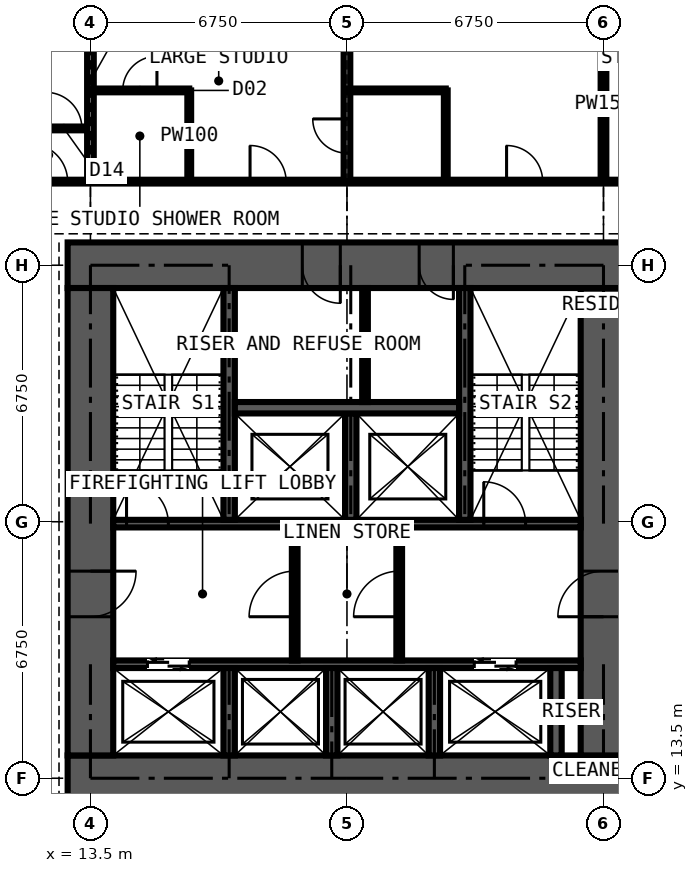
"""IFC4 building model, lengths in metres.
Left out: names, types, materials, properties, quantities, classifications, styles, units other than length and angle.
Written with IfcOpenShell. Run it as: python <this file> out.ifc"""

import sys

from ifc_helpers import new_model, si_unit, direction, frame, frame_2d, origin, place, context, subcontext, project, spatial, rectangle, extrude, element, fill, save


model = new_model("IFC4")
c1 = context("Model", 3, precision=1e-05, world=origin(), true_north=direction((0.0, 1.0)))
c2 = subcontext(c1, "Body", "Model", "MODEL_VIEW")
j1 = project(units=[si_unit("LENGTHUNIT", "METRE"), si_unit("PLANEANGLEUNIT", "RADIAN")], contexts=[c1])
p1 = place(None, origin())
s1 = spatial("IfcSite", under=j1, at=p1, CompositionType="ELEMENT")
p2 = place(p1, origin())
s2 = spatial("IfcBuilding", under=s1, at=p2, CompositionType="ELEMENT")
p3 = place(p2, frame((0.0, 0.0, 90.9)))
s3 = spatial("IfcBuildingStorey", under=s2, at=p3, CompositionType="ELEMENT", Elevation=90.9)
p4 = place(p3, frame((12.9, 13.5, 0.0), z_axis=(0.0, 0.0, 1.0), x_axis=(1.0, 0.0, 0.0)))
e1 = element("IfcWall", 1, at=p4, inside=s3, PredefinedType="SHEAR", context=c2, shape_type="SweptSolid", body=[
    extrude(rectangle(XDim=14.7, YDim=1.2, at=frame_2d((7.35, 0.0))), origin(), (0.0, 0.0, 1.0), 3.6),
])
p5 = place(p3, frame((27.0, 14.1, 0.0), z_axis=(0.0, 0.0, 1.0), x_axis=(0.0, 1.0, 0.0)))
e2 = element("IfcWall", 2, at=p5, inside=s3, PredefinedType="SHEAR", context=c2, shape_type="SweptSolid", body=[
    extrude(rectangle(XDim=12.3, YDim=1.2, at=frame_2d((6.15, 0.0))), origin(), (0.0, 0.0, 1.0), 3.6),
])
p6 = place(p5, frame((3.65, 0.0, 0.0)))
e3 = element("IfcOpeningElement", 3, at=p6, cuts=e2, PredefinedType="OPENING", context=c2, shape_type="SweptSolid", body=[
    extrude(rectangle(XDim=1.2, YDim=2.2, at=frame_2d((0.6, 1.1))), frame((0.0, 0.61, 0.0), z_axis=(0.0, -1.0, 0.0), x_axis=(1.0, 0.0, 0.0)), (0.0, 0.0, 1.0), 1.22),
])
p7 = place(p3, frame((27.6, 27.0, 0.0), z_axis=(0.0, 0.0, 1.0), x_axis=(-1.0, 0.0, 0.0)))
e4 = element("IfcWall", 4, at=p7, inside=s3, PredefinedType="SHEAR", context=c2, shape_type="SweptSolid", body=[
    extrude(rectangle(XDim=14.7, YDim=1.2, at=frame_2d((7.35, 0.0))), origin(), (0.0, 0.0, 1.0), 3.6),
])
p8 = place(p7, frame((4.55, 0.0, 0.0)))
e5 = element("IfcOpeningElement", 5, at=p8, cuts=e4, PredefinedType="OPENING", context=c2, shape_type="SweptSolid", body=[
    extrude(rectangle(XDim=0.9, YDim=2.2, at=frame_2d((0.45, 1.1))), frame((0.0, 0.61, 0.0), z_axis=(0.0, -1.0, 0.0), x_axis=(1.0, 0.0, 0.0)), (0.0, 0.0, 1.0), 1.22),
])
p9 = place(p7, frame((7.525, 0.0, 0.0)))
e6 = element("IfcOpeningElement", 6, at=p9, cuts=e4, PredefinedType="OPENING", context=c2, shape_type="SweptSolid", body=[
    extrude(rectangle(XDim=1.0, YDim=2.2, at=frame_2d((0.5, 1.1))), frame((0.0, 0.61, 0.0), z_axis=(0.0, -1.0, 0.0), x_axis=(1.0, 0.0, 0.0)), (0.0, 0.0, 1.0), 1.22),
])
p10 = place(p3, frame((13.5, 26.4, 0.0), z_axis=(0.0, 0.0, 1.0), x_axis=(0.0, -1.0, 0.0)))
e7 = element("IfcWall", 7, at=p10, inside=s3, PredefinedType="SHEAR", context=c2, shape_type="SweptSolid", body=[
    extrude(rectangle(XDim=12.3, YDim=1.2, at=frame_2d((6.15, 0.0))), origin(), (0.0, 0.0, 1.0), 3.6),
])
p11 = place(p10, frame((7.45, 0.0, 0.0)))
e8 = element("IfcOpeningElement", 8, at=p11, cuts=e7, PredefinedType="OPENING", context=c2, shape_type="SweptSolid", body=[
    extrude(rectangle(XDim=1.2, YDim=2.2, at=frame_2d((0.6, 1.1))), frame((0.0, 0.61, 0.0), z_axis=(0.0, -1.0, 0.0), x_axis=(1.0, 0.0, 0.0)), (0.0, 0.0, 1.0), 1.22),
])
p12 = place(p3, frame((14.1, 16.5, 0.0), z_axis=(0.0, 0.0, 1.0), x_axis=(1.0, 0.0, 0.0)))
e9 = element("IfcWall", 9, at=p12, inside=s3, PredefinedType="SHEAR", context=c2, shape_type="SweptSolid", body=[
    extrude(rectangle(XDim=12.3, YDim=0.2, at=frame_2d((6.15, 0.0))), origin(), (0.0, 0.0, 1.0), 3.6),
])
p13 = place(p12, frame((0.9, 0.0, 0.0)))
e10 = element("IfcOpeningElement", 10, at=p13, cuts=e9, PredefinedType="OPENING", context=c2, shape_type="SweptSolid", body=[
    extrude(rectangle(XDim=1.1, YDim=2.2, at=frame_2d((0.55, 1.1))), frame((0.0, 0.11, 0.0), z_axis=(0.0, -1.0, 0.0), x_axis=(1.0, 0.0, 0.0)), (0.0, 0.0, 1.0), 0.22),
])
p14 = place(p12, frame((9.5, 0.0, 0.0)))
e11 = element("IfcOpeningElement", 11, at=p14, cuts=e9, PredefinedType="OPENING", context=c2, shape_type="SweptSolid", body=[
    extrude(rectangle(XDim=1.1, YDim=2.2, at=frame_2d((0.55, 1.1))), frame((0.0, 0.11, 0.0), z_axis=(0.0, -1.0, 0.0), x_axis=(1.0, 0.0, 0.0)), (0.0, 0.0, 1.0), 0.22),
])
p15 = place(p3, frame((14.1, 20.2, 0.0), z_axis=(0.0, 0.0, 1.0), x_axis=(1.0, 0.0, 0.0)))
e12 = element("IfcWall", 12, at=p15, inside=s3, PredefinedType="SHEAR", context=c2, shape_type="SweptSolid", body=[
    extrude(rectangle(XDim=12.3, YDim=0.2, at=frame_2d((6.15, 0.0))), origin(), (0.0, 0.0, 1.0), 3.6),
])
p16 = place(p15, frame((0.35, 0.0, 0.0)))
e13 = element("IfcOpeningElement", 13, at=p16, cuts=e12, PredefinedType="OPENING", context=c2, shape_type="SweptSolid", body=[
    extrude(rectangle(XDim=1.1, YDim=2.2, at=frame_2d((0.55, 1.1))), frame((0.0, 0.11, 0.0), z_axis=(0.0, -1.0, 0.0), x_axis=(1.0, 0.0, 0.0)), (0.0, 0.0, 1.0), 0.22),
])
p17 = place(p15, frame((9.75, 0.0, 0.0)))
e14 = element("IfcOpeningElement", 14, at=p17, cuts=e12, PredefinedType="OPENING", context=c2, shape_type="SweptSolid", body=[
    extrude(rectangle(XDim=1.1, YDim=2.2, at=frame_2d((0.55, 1.1))), frame((0.0, 0.11, 0.0), z_axis=(0.0, -1.0, 0.0), x_axis=(1.0, 0.0, 0.0)), (0.0, 0.0, 1.0), 0.22),
])
for number, where, z_axis, x_axis in (
    (15, (17.15, 20.3, 0.0), (0.0, 0.0, 1.0), (0.0, 1.0, 0.0)),
    (16, (23.35, 20.3, 0.0), (0.0, 0.0, 1.0), (0.0, 1.0, 0.0)),
):
    element("IfcWall", number, at=place(p3, frame(where, z_axis=z_axis, x_axis=x_axis)), inside=s3, PredefinedType="SHEAR", context=c2, shape_type="SweptSolid", body=[
        extrude(rectangle(XDim=6.1, YDim=0.3, at=frame_2d((3.05, 0.0))), origin(), (0.0, 0.0, 1.0), 3.6),
    ])
p18 = place(p3, frame((20.35, 20.3, 0.0), z_axis=(0.0, 0.0, 1.0), x_axis=(0.0, 1.0, 0.0)))
e17 = element("IfcWall", 17, at=p18, inside=s3, PredefinedType="SHEAR", context=c2, shape_type="SweptSolid", body=[
    extrude(rectangle(XDim=2.8, YDim=0.3, at=frame_2d((1.4, 0.0))), origin(), (0.0, 0.0, 1.0), 3.6),
])
p19 = place(p3, frame((17.3, 23.25, 0.0), z_axis=(0.0, 0.0, 1.0), x_axis=(1.0, 0.0, 0.0)))
e18 = element("IfcWall", 18, at=p19, inside=s3, PredefinedType="SHEAR", context=c2, shape_type="SweptSolid", body=[
    extrude(rectangle(XDim=5.9, YDim=0.3, at=frame_2d((2.95, 0.0))), origin(), (0.0, 0.0, 1.0), 3.6),
])
for number, where, z_axis, x_axis in (
    (19, (17.15, 14.1, 0.0), (0.0, 0.0, 1.0), (0.0, 1.0, 0.0)),
    (20, (19.85, 14.1, 0.0), (0.0, 0.0, 1.0), (0.0, 1.0, 0.0)),
    (21, (22.55, 14.1, 0.0), (0.0, 0.0, 1.0), (0.0, 1.0, 0.0)),
    (22, (25.75, 14.1, 0.0), (0.0, 0.0, 1.0), (0.0, 1.0, 0.0)),
):
    element("IfcWall", number, at=place(p3, frame(where, z_axis=z_axis, x_axis=x_axis)), inside=s3, PredefinedType="SHEAR", context=c2, shape_type="SweptSolid", body=[
        extrude(rectangle(XDim=2.3, YDim=0.3, at=frame_2d((1.15, 0.0))), origin(), (0.0, 0.0, 1.0), 3.6),
    ])
p20 = place(p3, frame((18.875, 16.6, 0.0), z_axis=(0.0, 0.0, 1.0), x_axis=(0.0, 1.0, 0.0)))
e23 = element("IfcWall", 23, at=p20, inside=s3, PredefinedType="PARTITIONING", context=c2, shape_type="SweptSolid", body=[
    extrude(rectangle(XDim=3.5, YDim=0.15, at=frame_2d((1.75, 0.0))), origin(), (0.0, 0.0, 1.0), 3.375),
])
p21 = place(p20, frame((1.15, 0.0, 0.0)))
e24 = element("IfcOpeningElement", 24, at=p21, cuts=e23, PredefinedType="OPENING", context=c2, shape_type="SweptSolid", body=[
    extrude(rectangle(XDim=1.2, YDim=2.2, at=frame_2d((0.6, 1.1))), frame((0.0, 0.085, 0.0), z_axis=(0.0, -1.0, 0.0), x_axis=(1.0, 0.0, 0.0)), (0.0, 0.0, 1.0), 0.17),
])
p22 = place(p3, frame((21.625, 16.6, 0.0), z_axis=(0.0, 0.0, 1.0), x_axis=(0.0, 1.0, 0.0)))
e25 = element("IfcWall", 25, at=p22, inside=s3, PredefinedType="PARTITIONING", context=c2, shape_type="SweptSolid", body=[
    extrude(rectangle(XDim=3.5, YDim=0.15, at=frame_2d((1.75, 0.0))), origin(), (0.0, 0.0, 1.0), 3.375),
])
p23 = place(p22, frame((1.15, 0.0, 0.0)))
e26 = element("IfcOpeningElement", 26, at=p23, cuts=e25, PredefinedType="OPENING", context=c2, shape_type="SweptSolid", body=[
    extrude(rectangle(XDim=1.2, YDim=2.2, at=frame_2d((0.6, 1.1))), frame((0.0, 0.085, 0.0), z_axis=(0.0, -1.0, 0.0), x_axis=(1.0, 0.0, 0.0)), (0.0, 0.0, 1.0), 0.17),
])
p24 = place(p3, frame((20.725, 23.4, 0.0), z_axis=(0.0, 0.0, 1.0), x_axis=(0.0, 1.0, 0.0)))
e27 = element("IfcWall", 27, at=p24, inside=s3, PredefinedType="PARTITIONING", context=c2, shape_type="SweptSolid", body=[
    extrude(rectangle(XDim=3.0, YDim=0.15, at=frame_2d((1.5, 0.0))), origin(), (0.0, 0.0, 1.0), 3.375),
])
p25 = place(p3, frame((10.125, 30.6, 0.0), z_axis=(0.0, 0.0, 1.0), x_axis=(1.0, 0.0, 0.0)))
e28 = element("IfcWall", 28, at=p25, inside=s3, PredefinedType="PARTITIONING", context=c2, shape_type="SweptSolid", body=[
    extrude(rectangle(XDim=3.375, YDim=0.1, at=frame_2d((1.688, 0.0))), origin(), (0.0, 0.0, 1.0), 3.375),
])
p26 = place(p25, frame((2.2, 0.0, 0.0)))
e29 = element("IfcOpeningElement", 29, at=p26, cuts=e28, PredefinedType="OPENING", context=c2, shape_type="SweptSolid", body=[
    extrude(rectangle(XDim=0.95, YDim=2.2, at=frame_2d((0.475, 1.1))), frame((0.0, 0.06, 0.0), z_axis=(0.0, -1.0, 0.0), x_axis=(1.0, 0.0, 0.0)), (0.0, 0.0, 1.0), 0.12),
])
p27 = place(p3, frame((11.3, 29.2, 0.0), z_axis=(0.0, 0.0, 1.0), x_axis=(1.0, 0.0, 0.0)))
e30 = element("IfcWall", 30, at=p27, inside=s3, PredefinedType="PARTITIONING", context=c2, shape_type="SweptSolid", body=[
    extrude(rectangle(XDim=19.075, YDim=0.1, at=frame_2d((9.538, 0.0))), origin(), (0.0, 0.0, 1.0), 3.375),
])
p28 = place(p27, frame((6.4, 0.0, 0.0)))
e31 = element("IfcOpeningElement", 31, at=p28, cuts=e30, PredefinedType="OPENING", context=c2, shape_type="SweptSolid", body=[
    extrude(rectangle(XDim=0.95, YDim=2.2, at=frame_2d((0.475, 1.1))), frame((0.0, 0.06, 0.0), z_axis=(0.0, -1.0, 0.0), x_axis=(1.0, 0.0, 0.0)), (0.0, 0.0, 1.0), 0.12),
])
p29 = place(p27, frame((13.15, 0.0, 0.0)))
e32 = element("IfcOpeningElement", 32, at=p29, cuts=e30, PredefinedType="OPENING", context=c2, shape_type="SweptSolid", body=[
    extrude(rectangle(XDim=0.95, YDim=2.2, at=frame_2d((0.475, 1.1))), frame((0.0, 0.06, 0.0), z_axis=(0.0, -1.0, 0.0), x_axis=(1.0, 0.0, 0.0)), (0.0, 0.0, 1.0), 0.12),
])
p30 = place(p27, frame((0.6, 0.0, 0.0)))
e33 = element("IfcOpeningElement", 33, at=p30, cuts=e30, PredefinedType="OPENING", context=c2, shape_type="SweptSolid", body=[
    extrude(rectangle(XDim=1.0, YDim=2.2, at=frame_2d((0.5, 1.1))), frame((0.0, 0.06, 0.0), z_axis=(0.0, -1.0, 0.0), x_axis=(1.0, 0.0, 0.0)), (0.0, 0.0, 1.0), 0.12),
])
p31 = place(p3, frame((13.5, 29.2, 0.0), z_axis=(0.0, 0.0, 1.0), x_axis=(0.0, 1.0, 0.0)))
e34 = element("IfcWall", 34, at=p31, inside=s3, PredefinedType="PARTITIONING", context=c2, shape_type="SweptSolid", body=[
    extrude(rectangle(XDim=5.284, YDim=0.175, at=frame_2d((2.642, 0.0))), origin(), (0.0, 0.0, 1.0), 2.61),
])
p32 = place(p3, frame((13.5, 31.6, 0.0), z_axis=(0.0, 0.0, 1.0), x_axis=(1.0, 0.0, 0.0)))
e35 = element("IfcWall", 35, at=p32, inside=s3, PredefinedType="PARTITIONING", context=c2, shape_type="SweptSolid", body=[
    extrude(rectangle(XDim=2.6, YDim=0.1, at=frame_2d((1.3, 0.0))), origin(), (0.0, 0.0, 1.0), 3.375),
])
p33 = place(p32, frame((0.85, 0.0, 0.0)))
e36 = element("IfcOpeningElement", 36, at=p33, cuts=e35, PredefinedType="OPENING", context=c2, shape_type="SweptSolid", body=[
    extrude(rectangle(XDim=0.9, YDim=2.2, at=frame_2d((0.45, 1.1))), frame((0.0, 0.06, 0.0), z_axis=(0.0, -1.0, 0.0), x_axis=(1.0, 0.0, 0.0)), (0.0, 0.0, 1.0), 0.12),
])
p34 = place(p3, frame((16.1, 29.2, 0.0), z_axis=(0.0, 0.0, 1.0), x_axis=(0.0, 1.0, 0.0)))
e37 = element("IfcWall", 37, at=p34, inside=s3, PredefinedType="PARTITIONING", context=c2, shape_type="SweptSolid", body=[
    extrude(rectangle(XDim=2.4, YDim=0.1, at=frame_2d((1.2, 0.0))), origin(), (0.0, 0.0, 1.0), 3.375),
])
p35 = place(p3, frame((20.25, 29.2, 0.0), z_axis=(0.0, 0.0, 1.0), x_axis=(0.0, 1.0, 0.0)))
e38 = element("IfcWall", 38, at=p35, inside=s3, PredefinedType="PARTITIONING", context=c2, shape_type="SweptSolid", body=[
    extrude(rectangle(XDim=5.284, YDim=0.175, at=frame_2d((2.642, 0.0))), origin(), (0.0, 0.0, 1.0), 2.61),
])
p36 = place(p35, frame((0.75, 0.0, 0.0)))
e39 = element("IfcOpeningElement", 39, at=p36, cuts=e38, PredefinedType="OPENING", context=c2, shape_type="SweptSolid", body=[
    extrude(rectangle(XDim=0.9, YDim=2.2, at=frame_2d((0.45, 1.1))), frame((0.0, 0.097, 0.0), z_axis=(0.0, -1.0, 0.0), x_axis=(1.0, 0.0, 0.0)), (0.0, 0.0, 1.0), 0.195),
])
p37 = place(p3, frame((20.25, 31.6, 0.0), z_axis=(0.0, 0.0, 1.0), x_axis=(1.0, 0.0, 0.0)))
e40 = element("IfcWall", 40, at=p37, inside=s3, PredefinedType="PARTITIONING", context=c2, shape_type="SweptSolid", body=[
    extrude(rectangle(XDim=2.6, YDim=0.1, at=frame_2d((1.3, 0.0))), origin(), (0.0, 0.0, 1.0), 3.375),
])
p38 = place(p3, frame((22.85, 29.2, 0.0), z_axis=(0.0, 0.0, 1.0), x_axis=(0.0, 1.0, 0.0)))
e41 = element("IfcWall", 41, at=p38, inside=s3, PredefinedType="PARTITIONING", context=c2, shape_type="SweptSolid", body=[
    extrude(rectangle(XDim=2.4, YDim=0.1, at=frame_2d((1.2, 0.0))), origin(), (0.0, 0.0, 1.0), 3.375),
])
p39 = place(p3, frame((27.0, 29.2, 0.0), z_axis=(0.0, 0.0, 1.0), x_axis=(0.0, 1.0, 0.0)))
e42 = element("IfcWall", 42, at=p39, inside=s3, PredefinedType="PARTITIONING", context=c2, shape_type="SweptSolid", body=[
    extrude(rectangle(XDim=5.284, YDim=0.15, at=frame_2d((2.642, 0.0))), origin(), (0.0, 0.0, 1.0), 2.806),
])
p40 = place(p13, origin())
e43 = element("IfcDoor", 43, at=p40, inside=s3, OperationType="DOUBLE_DOOR_SLIDING", PredefinedType="DOOR", context=c2, shape_type="SweptSolid", body=[
    extrude(rectangle(XDim=1.1, YDim=2.2, at=frame_2d((0.55, 1.1))), frame((0.0, 0.025, 0.0), z_axis=(0.0, -1.0, 0.0), x_axis=(1.0, 0.0, 0.0)), (0.0, 0.0, 1.0), 0.05),
])
fill(e10, e43)
p41 = place(p14, origin())
e44 = element("IfcDoor", 44, at=p41, inside=s3, OperationType="DOUBLE_DOOR_SLIDING", PredefinedType="DOOR", context=c2, shape_type="SweptSolid", body=[
    extrude(rectangle(XDim=1.1, YDim=2.2, at=frame_2d((0.55, 1.1))), frame((0.0, 0.025, 0.0), z_axis=(0.0, -1.0, 0.0), x_axis=(1.0, 0.0, 0.0)), (0.0, 0.0, 1.0), 0.05),
])
fill(e11, e44)
p42 = place(p11, origin())
e45 = element("IfcDoor", 45, at=p42, inside=s3, OperationType="DOUBLE_DOOR_SINGLE_SWING", PredefinedType="DOOR", context=c2, shape_type="SweptSolid", body=[
    extrude(rectangle(XDim=1.2, YDim=2.2, at=frame_2d((0.6, 1.1))), frame((0.0, 0.025, 0.0), z_axis=(0.0, -1.0, 0.0), x_axis=(1.0, 0.0, 0.0)), (0.0, 0.0, 1.0), 0.05),
])
fill(e8, e45)
p43 = place(p6, origin())
e46 = element("IfcDoor", 46, at=p43, inside=s3, OperationType="DOUBLE_DOOR_SINGLE_SWING", PredefinedType="DOOR", context=c2, shape_type="SweptSolid", body=[
    extrude(rectangle(XDim=1.2, YDim=2.2, at=frame_2d((0.6, 1.1))), frame((0.0, 0.025, 0.0), z_axis=(0.0, -1.0, 0.0), x_axis=(1.0, 0.0, 0.0)), (0.0, 0.0, 1.0), 0.05),
])
fill(e3, e46)
p44 = place(p21, origin())
e47 = element("IfcDoor", 47, at=p44, inside=s3, OperationType="DOUBLE_DOOR_SINGLE_SWING", PredefinedType="DOOR", context=c2, shape_type="SweptSolid", body=[
    extrude(rectangle(XDim=1.2, YDim=2.2, at=frame_2d((0.6, 1.1))), frame((0.0, 0.025, 0.0), z_axis=(0.0, -1.0, 0.0), x_axis=(1.0, 0.0, 0.0)), (0.0, 0.0, 1.0), 0.05),
])
fill(e24, e47)
p45 = place(p23, origin())
e48 = element("IfcDoor", 48, at=p45, inside=s3, OperationType="DOUBLE_DOOR_SINGLE_SWING", PredefinedType="DOOR", context=c2, shape_type="SweptSolid", body=[
    extrude(rectangle(XDim=1.2, YDim=2.2, at=frame_2d((0.6, 1.1))), frame((0.0, 0.025, 0.0), z_axis=(0.0, -1.0, 0.0), x_axis=(1.0, 0.0, 0.0)), (0.0, 0.0, 1.0), 0.05),
])
fill(e26, e48)
p46 = place(p8, origin())
e49 = element("IfcDoor", 49, at=p46, inside=s3, OperationType="SINGLE_SWING_LEFT", PredefinedType="DOOR", context=c2, shape_type="SweptSolid", body=[
    extrude(rectangle(XDim=0.9, YDim=2.2, at=frame_2d((0.45, 1.1))), frame((0.0, 0.4, 0.0), z_axis=(0.0, -1.0, 0.0), x_axis=(1.0, 0.0, 0.0)), (0.0, 0.0, 1.0), 0.8),
])
fill(e5, e49)
p47 = place(p9, origin())
e50 = element("IfcDoor", 50, at=p47, inside=s3, OperationType="SINGLE_SWING_LEFT", PredefinedType="DOOR", context=c2, shape_type="SweptSolid", body=[
    extrude(rectangle(XDim=1.0, YDim=2.2, at=frame_2d((0.5, 1.1))), frame((0.0, 0.025, 0.0), z_axis=(0.0, -1.0, 0.0), x_axis=(1.0, 0.0, 0.0)), (0.0, 0.0, 1.0), 0.05),
])
fill(e6, e50)
p48 = place(p16, origin())
e51 = element("IfcDoor", 51, at=p48, inside=s3, OperationType="SINGLE_SWING_LEFT", PredefinedType="DOOR", context=c2, shape_type="SweptSolid", body=[
    extrude(rectangle(XDim=1.1, YDim=2.2, at=frame_2d((0.55, 1.1))), frame((0.0, 0.025, 0.0), z_axis=(0.0, -1.0, 0.0), x_axis=(1.0, 0.0, 0.0)), (0.0, 0.0, 1.0), 0.05),
])
fill(e13, e51)
p49 = place(p17, origin())
e52 = element("IfcDoor", 52, at=p49, inside=s3, OperationType="SINGLE_SWING_LEFT", PredefinedType="DOOR", context=c2, shape_type="SweptSolid", body=[
    extrude(rectangle(XDim=1.1, YDim=2.2, at=frame_2d((0.55, 1.1))), frame((0.0, 0.025, 0.0), z_axis=(0.0, -1.0, 0.0), x_axis=(1.0, 0.0, 0.0)), (0.0, 0.0, 1.0), 0.05),
])
fill(e14, e52)
p50 = place(p28, origin())
e53 = element("IfcDoor", 53, at=p50, inside=s3, OperationType="SINGLE_SWING_LEFT", PredefinedType="DOOR", context=c2, shape_type="SweptSolid", body=[
    extrude(rectangle(XDim=0.95, YDim=2.2, at=frame_2d((0.475, 1.1))), frame((0.0, 0.025, 0.0), z_axis=(0.0, -1.0, 0.0), x_axis=(1.0, 0.0, 0.0)), (0.0, 0.0, 1.0), 0.05),
])
fill(e31, e53)
p51 = place(p33, origin())
e54 = element("IfcDoor", 54, at=p51, inside=s3, OperationType="SINGLE_SWING_RIGHT", PredefinedType="DOOR", context=c2, shape_type="SweptSolid", body=[
    extrude(rectangle(XDim=0.9, YDim=2.2, at=frame_2d((0.45, 1.1))), frame((0.0, 0.025, 0.0), z_axis=(0.0, -1.0, 0.0), x_axis=(1.0, 0.0, 0.0)), (0.0, 0.0, 1.0), 0.05),
])
fill(e36, e54)
p52 = place(p29, origin())
e55 = element("IfcDoor", 55, at=p52, inside=s3, OperationType="SINGLE_SWING_LEFT", PredefinedType="DOOR", context=c2, shape_type="SweptSolid", body=[
    extrude(rectangle(XDim=0.95, YDim=2.2, at=frame_2d((0.475, 1.1))), frame((0.0, 0.025, 0.0), z_axis=(0.0, -1.0, 0.0), x_axis=(1.0, 0.0, 0.0)), (0.0, 0.0, 1.0), 0.05),
])
fill(e32, e55)
p53 = place(p36, origin())
e56 = element("IfcDoor", 56, at=p53, inside=s3, OperationType="SINGLE_SWING_RIGHT", PredefinedType="DOOR", context=c2, shape_type="SweptSolid", body=[
    extrude(rectangle(XDim=0.9, YDim=2.2, at=frame_2d((0.45, 1.1))), frame((0.0, 0.025, 0.0), z_axis=(0.0, -1.0, 0.0), x_axis=(1.0, 0.0, 0.0)), (0.0, 0.0, 1.0), 0.05),
])
fill(e39, e56)
p54 = place(p26, origin())
e57 = element("IfcDoor", 57, at=p54, inside=s3, OperationType="SINGLE_SWING_LEFT", PredefinedType="DOOR", context=c2, shape_type="SweptSolid", body=[
    extrude(rectangle(XDim=0.95, YDim=2.2, at=frame_2d((0.475, 1.1))), frame((0.0, 0.025, 0.0), z_axis=(0.0, -1.0, 0.0), x_axis=(1.0, 0.0, 0.0)), (0.0, 0.0, 1.0), 0.05),
])
fill(e29, e57)
p55 = place(p30, origin())
e58 = element("IfcDoor", 58, at=p55, inside=s3, OperationType="SINGLE_SWING_LEFT", PredefinedType="DOOR", context=c2, shape_type="SweptSolid", body=[
    extrude(rectangle(XDim=1.0, YDim=2.2, at=frame_2d((0.5, 1.1))), frame((0.0, 0.025, 0.0), z_axis=(0.0, -1.0, 0.0), x_axis=(1.0, 0.0, 0.0)), (0.0, 0.0, 1.0), 0.05),
])
fill(e33, e58)
save(model, sys.argv[1])
